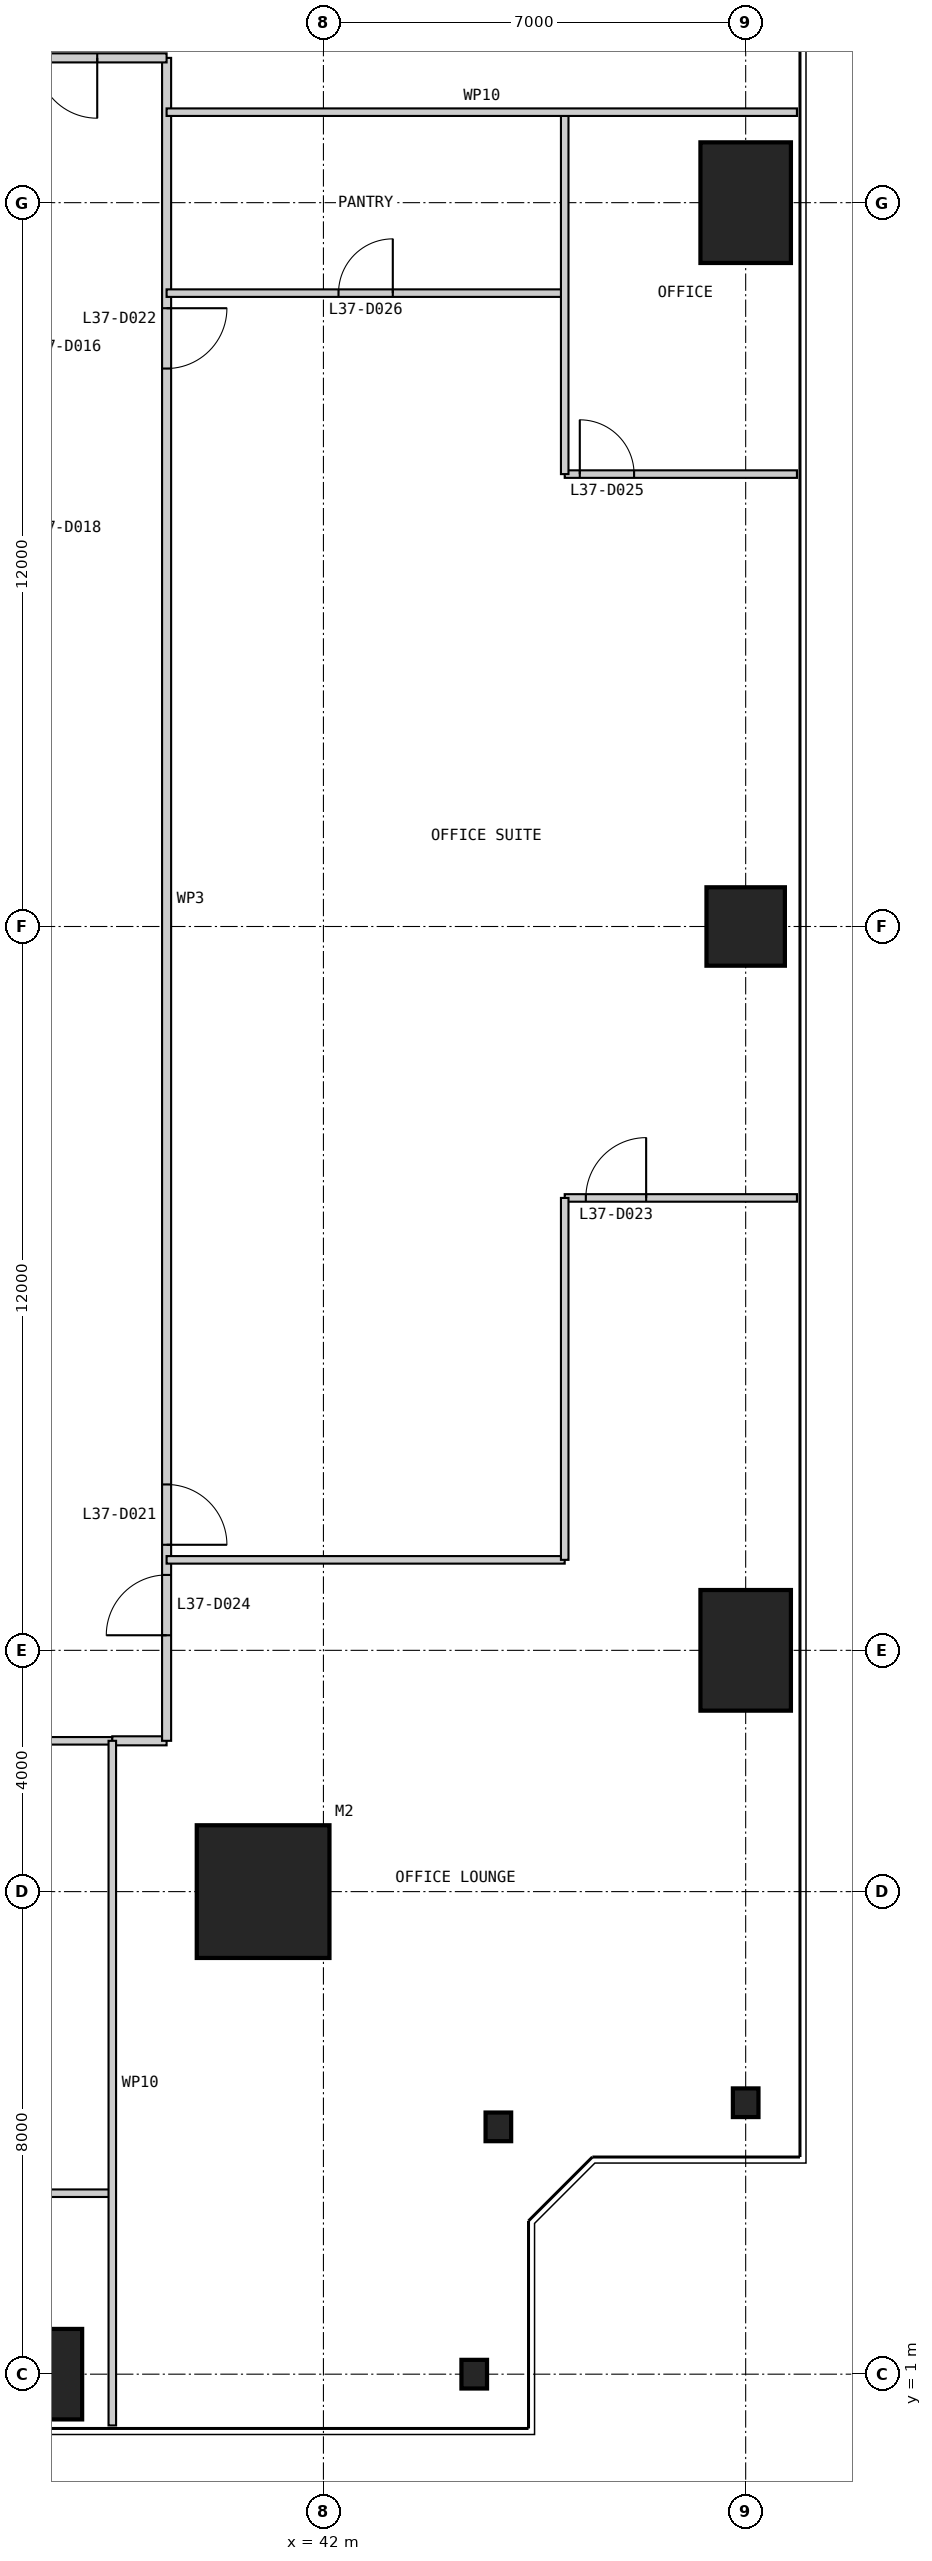
"""IFC4 building model, lengths in metres.
Left out: names, types, materials, properties, quantities, classifications, styles, units other than length and angle.
Written with IfcOpenShell. Run it as: python <this file> out.ifc"""

import sys

from ifc_helpers import new_model, si_unit, direction, frame, frame_2d, origin, origin_2d, place, context, subcontext, project, spatial, rectangle, i_section, extrude, element, fill, save


model = new_model("IFC4")
c1 = context("Model", 3, precision=1e-05, world=origin(), true_north=direction((0.0, 1.0)))
c2 = subcontext(c1, "Body", "Model", "MODEL_VIEW")
j1 = project(units=[si_unit("LENGTHUNIT", "METRE"), si_unit("PLANEANGLEUNIT", "RADIAN")], contexts=[c1])
p1 = place(None, origin())
s1 = spatial("IfcSite", under=j1, at=p1, CompositionType="ELEMENT")
p2 = place(p1, origin())
s2 = spatial("IfcBuilding", under=s1, at=p2, CompositionType="ELEMENT")
p3 = place(p2, frame((0.0, 0.0, 158.4)))
s3 = spatial("IfcBuildingStorey", under=s2, at=p3, CompositionType="ELEMENT", Elevation=158.4)
p4 = place(p3, frame((41.0, 9.0, 0.0), z_axis=(0.0, 0.0, 1.0), x_axis=(1.0, 0.0, 0.0)))
e1 = element("IfcColumn", 1, at=p4, inside=s3, PredefinedType="COLUMN", context=c2, shape_type="SweptSolid", body=[
    extrude(rectangle(XDim=2.2, YDim=2.2, at=origin_2d()), origin(), (0.0, 0.0, 1.0), 4.0),
])
p5 = place(p3, frame((37.0, 1.0, 0.0), z_axis=(0.0, 0.0, 1.0), x_axis=(1.0, 0.0, 0.0)))
e2 = element("IfcColumn", 2, at=p5, inside=s3, PredefinedType="COLUMN", context=c2, shape_type="SweptSolid", body=[
    extrude(rectangle(XDim=2.0, YDim=1.5, at=origin_2d()), origin(), (0.0, 0.0, 1.0), 4.0),
])
for number, where, z_axis, x_axis in (
    (3, (44.5, 1.0, 0.0), (0.0, 0.0, 1.0), (1.0, 0.0, 0.0)),
    (4, (44.9, 5.1, 0.0), (0.0, 0.0, 1.0), (1.0, 0.0, 0.0)),
    (5, (49.0, 5.5, 0.0), (0.0, 0.0, 1.0), (1.0, 0.0, 0.0)),
):
    element("IfcColumn", number, at=place(p3, frame(where, z_axis=z_axis, x_axis=x_axis)), inside=s3, PredefinedType="COLUMN", context=c2, shape_type="SweptSolid", body=[
        extrude(i_section(OverallWidth=0.424, OverallDepth=0.475, WebThickness=0.048, FlangeThickness=0.077, at=origin_2d()), origin(), (0.0, 0.0, 1.0), 4.0),
    ])
p6 = place(p3, frame((49.0, 13.0, 0.0), z_axis=(0.0, 0.0, 1.0), x_axis=(1.0, 0.0, 0.0)))
e6 = element("IfcColumn", 6, at=p6, inside=s3, PredefinedType="COLUMN", context=c2, shape_type="SweptSolid", body=[
    extrude(rectangle(XDim=1.5, YDim=2.0, at=origin_2d()), origin(), (0.0, 0.0, 1.0), 4.0),
])
p7 = place(p3, frame((49.0, 25.0, 0.0), z_axis=(0.0, 0.0, 1.0), x_axis=(1.0, 0.0, 0.0)))
e7 = element("IfcColumn", 7, at=p7, inside=s3, PredefinedType="COLUMN", context=c2, shape_type="SweptSolid", body=[
    extrude(rectangle(XDim=1.3, YDim=1.3, at=origin_2d()), origin(), (0.0, 0.0, 1.0), 4.0),
])
p8 = place(p3, frame((49.0, 37.0, 0.0), z_axis=(0.0, 0.0, 1.0), x_axis=(1.0, 0.0, 0.0)))
e8 = element("IfcColumn", 8, at=p8, inside=s3, PredefinedType="COLUMN", context=c2, shape_type="SweptSolid", body=[
    extrude(rectangle(XDim=1.5, YDim=2.0, at=origin_2d()), origin(), (0.0, 0.0, 1.0), 4.0),
])
p9 = place(p3, frame((32.5, 4.0, 0.0), z_axis=(0.0, 0.0, 1.0), x_axis=(1.0, 0.0, 0.0)))
e9 = element("IfcWall", 9, at=p9, inside=s3, PredefinedType="PARTITIONING", context=c2, shape_type="SweptSolid", body=[
    extrude(rectangle(XDim=6.0, YDim=0.125, at=frame_2d((3.0, 0.0))), origin(), (0.0, 0.0, 1.0), 3.8),
])
p10 = place(p3, frame((35.5, 11.5, 0.0), z_axis=(0.0, 0.0, 1.0), x_axis=(1.0, 0.0, 0.0)))
e10 = element("IfcWall", 10, at=p10, inside=s3, PredefinedType="PARTITIONING", context=c2, shape_type="SweptSolid", body=[
    extrude(rectangle(XDim=3.0, YDim=0.125, at=frame_2d((1.5, 0.0))), origin(), (0.0, 0.0, 1.0), 3.8),
])
p11 = place(p3, frame((38.5, 11.5, 0.0), z_axis=(0.0, 0.0, 1.0), x_axis=(1.0, 0.0, 0.0)))
e11 = element("IfcWall", 11, at=p11, inside=s3, PredefinedType="PARTITIONING", context=c2, shape_type="SweptSolid", body=[
    extrude(rectangle(XDim=0.9, YDim=0.15, at=frame_2d((0.45, 0.0))), origin(), (0.0, 0.0, 1.0), 3.8),
])
p12 = place(p3, frame((39.4, 11.5, 0.0), z_axis=(0.0, 0.0, 1.0), x_axis=(0.0, 1.0, 0.0)))
e12 = element("IfcWall", 12, at=p12, inside=s3, PredefinedType="PARTITIONING", context=c2, shape_type="SweptSolid", body=[
    extrude(rectangle(XDim=27.9, YDim=0.15, at=frame_2d((13.95, 0.0))), origin(), (0.0, 0.0, 1.0), 3.8),
])
p13 = place(p12, frame((3.25, 0.0, 0.0)))
e13 = element("IfcOpeningElement", 13, at=p13, cuts=e12, PredefinedType="OPENING", context=c2, shape_type="SweptSolid", body=[
    extrude(rectangle(XDim=1.0, YDim=2.2, at=frame_2d((0.5, 1.1))), frame((0.0, 0.085, 0.0), z_axis=(0.0, -1.0, 0.0), x_axis=(1.0, 0.0, 0.0)), (0.0, 0.0, 1.0), 0.17),
])
p14 = place(p12, frame((22.75, 0.0, 0.0)))
e14 = element("IfcOpeningElement", 14, at=p14, cuts=e12, PredefinedType="OPENING", context=c2, shape_type="SweptSolid", body=[
    extrude(rectangle(XDim=1.0, YDim=2.2, at=frame_2d((0.5, 1.1))), frame((0.0, 0.085, 0.0), z_axis=(0.0, -1.0, 0.0), x_axis=(1.0, 0.0, 0.0)), (0.0, 0.0, 1.0), 0.17),
])
p15 = place(p12, frame((1.75, 0.0, 0.0)))
e15 = element("IfcOpeningElement", 15, at=p15, cuts=e12, PredefinedType="OPENING", context=c2, shape_type="SweptSolid", body=[
    extrude(rectangle(XDim=1.0, YDim=2.2, at=frame_2d((0.5, 1.1))), frame((0.0, 0.085, 0.0), z_axis=(0.0, -1.0, 0.0), x_axis=(1.0, 0.0, 0.0)), (0.0, 0.0, 1.0), 0.17),
])
p16 = place(p3, frame((38.5, 0.15, 0.0), z_axis=(0.0, 0.0, 1.0), x_axis=(0.0, 1.0, 0.0)))
e16 = element("IfcWall", 16, at=p16, inside=s3, PredefinedType="PARTITIONING", context=c2, shape_type="SweptSolid", body=[
    extrude(rectangle(XDim=11.35, YDim=0.125, at=frame_2d((5.675, 0.0))), origin(), (0.0, 0.0, 1.0), 3.8),
])
p17 = place(p3, frame((46.0, 14.5, 0.0), z_axis=(0.0, 0.0, 1.0), x_axis=(-1.0, 0.0, 0.0)))
e17 = element("IfcWall", 17, at=p17, inside=s3, PredefinedType="PARTITIONING", context=c2, shape_type="SweptSolid", body=[
    extrude(rectangle(XDim=6.6, YDim=0.125, at=frame_2d((3.3, 0.0))), origin(), (0.0, 0.0, 1.0), 3.8),
])
p18 = place(p3, frame((49.85, 20.5, 0.0), z_axis=(0.0, 0.0, 1.0), x_axis=(-1.0, 0.0, 0.0)))
e18 = element("IfcWall", 18, at=p18, inside=s3, PredefinedType="PARTITIONING", context=c2, shape_type="SweptSolid", body=[
    extrude(rectangle(XDim=3.85, YDim=0.125, at=frame_2d((1.925, 0.0))), origin(), (0.0, 0.0, 1.0), 3.8),
])
p19 = place(p18, frame((2.5, 0.0, 0.0)))
e19 = element("IfcOpeningElement", 19, at=p19, cuts=e18, PredefinedType="OPENING", context=c2, shape_type="SweptSolid", body=[
    extrude(rectangle(XDim=1.0, YDim=2.2, at=frame_2d((0.5, 1.1))), frame((0.0, 0.073, 0.0), z_axis=(0.0, -1.0, 0.0), x_axis=(1.0, 0.0, 0.0)), (0.0, 0.0, 1.0), 0.145),
])
p20 = place(p3, frame((49.85, 32.5, 0.0), z_axis=(0.0, 0.0, 1.0), x_axis=(-1.0, 0.0, 0.0)))
e20 = element("IfcWall", 20, at=p20, inside=s3, PredefinedType="PARTITIONING", context=c2, shape_type="SweptSolid", body=[
    extrude(rectangle(XDim=3.85, YDim=0.125, at=frame_2d((1.925, 0.0))), origin(), (0.0, 0.0, 1.0), 3.8),
])
p21 = place(p20, frame((2.7, 0.0, 0.0)))
e21 = element("IfcOpeningElement", 21, at=p21, cuts=e20, PredefinedType="OPENING", context=c2, shape_type="SweptSolid", body=[
    extrude(rectangle(XDim=0.9, YDim=2.2, at=frame_2d((0.45, 1.1))), frame((0.0, 0.073, 0.0), z_axis=(0.0, -1.0, 0.0), x_axis=(1.0, 0.0, 0.0)), (0.0, 0.0, 1.0), 0.145),
])
p22 = place(p3, frame((46.0, 35.5, 0.0), z_axis=(0.0, 0.0, 1.0), x_axis=(-1.0, 0.0, 0.0)))
e22 = element("IfcWall", 22, at=p22, inside=s3, PredefinedType="PARTITIONING", context=c2, shape_type="SweptSolid", body=[
    extrude(rectangle(XDim=6.6, YDim=0.125, at=frame_2d((3.3, 0.0))), origin(), (0.0, 0.0, 1.0), 3.8),
])
p23 = place(p22, frame((2.85, 0.0, 0.0)))
e23 = element("IfcOpeningElement", 23, at=p23, cuts=e22, PredefinedType="OPENING", context=c2, shape_type="SweptSolid", body=[
    extrude(rectangle(XDim=0.9, YDim=2.2, at=frame_2d((0.45, 1.1))), frame((0.0, 0.073, 0.0), z_axis=(0.0, -1.0, 0.0), x_axis=(1.0, 0.0, 0.0)), (0.0, 0.0, 1.0), 0.145),
])
for number, where, z_axis, x_axis in (
    (24, (46.0, 14.5, 0.0), (0.0, 0.0, 1.0), (0.0, 1.0, 0.0)),
    (25, (46.0, 32.5, 0.0), (0.0, 0.0, 1.0), (0.0, 1.0, 0.0)),
):
    element("IfcWall", number, at=place(p3, frame(where, z_axis=z_axis, x_axis=x_axis)), inside=s3, PredefinedType="PARTITIONING", context=c2, shape_type="SweptSolid", body=[
        extrude(rectangle(XDim=6.0, YDim=0.125, at=frame_2d((3.0, 0.0))), origin(), (0.0, 0.0, 1.0), 2.954),
    ])
p24 = place(p3, frame((39.4, 39.4, 0.0), z_axis=(0.0, 0.0, 1.0), x_axis=(-1.0, 0.0, 0.0)))
e26 = element("IfcWall", 26, at=p24, inside=s3, PredefinedType="PARTITIONING", context=c2, shape_type="SweptSolid", body=[
    extrude(rectangle(XDim=28.8, YDim=0.15, at=frame_2d((14.4, 0.0))), origin(), (0.0, 0.0, 1.0), 3.8),
])
p25 = place(p24, frame((4.15, 0.0, 0.0)))
e27 = element("IfcOpeningElement", 27, at=p25, cuts=e26, PredefinedType="OPENING", context=c2, shape_type="SweptSolid", body=[
    extrude(rectangle(XDim=1.0, YDim=2.2, at=frame_2d((0.5, 1.1))), frame((0.0, 0.085, 0.0), z_axis=(0.0, -1.0, 0.0), x_axis=(1.0, 0.0, 0.0)), (0.0, 0.0, 1.0), 0.17),
])
p26 = place(p24, frame((23.65, 0.0, 0.0)))
e28 = element("IfcOpeningElement", 28, at=p26, cuts=e26, PredefinedType="OPENING", context=c2, shape_type="SweptSolid", body=[
    extrude(rectangle(XDim=1.0, YDim=2.2, at=frame_2d((0.5, 1.1))), frame((0.0, 0.085, 0.0), z_axis=(0.0, -1.0, 0.0), x_axis=(1.0, 0.0, 0.0)), (0.0, 0.0, 1.0), 0.17),
])
p27 = place(p24, frame((1.15, 0.0, 0.0)))
e29 = element("IfcOpeningElement", 29, at=p27, cuts=e26, PredefinedType="OPENING", context=c2, shape_type="SweptSolid", body=[
    extrude(rectangle(XDim=1.0, YDim=2.2, at=frame_2d((0.5, 1.1))), frame((0.0, 0.085, 0.0), z_axis=(0.0, -1.0, 0.0), x_axis=(1.0, 0.0, 0.0)), (0.0, 0.0, 1.0), 0.17),
])
p28 = place(p3, frame((49.85, 38.5, 0.0), z_axis=(0.0, 0.0, 1.0), x_axis=(-1.0, 0.0, 0.0)))
e30 = element("IfcWall", 30, at=p28, inside=s3, PredefinedType="PARTITIONING", context=c2, shape_type="SweptSolid", body=[
    extrude(rectangle(XDim=10.45, YDim=0.125, at=frame_2d((5.225, 0.0))), origin(), (0.0, 0.0, 1.0), 3.8),
])
p29 = place(p13, frame((1.0, 0.0, 0.0), z_axis=(0.0, 0.0, 1.0), x_axis=(-1.0, 0.0, 0.0)))
e31 = element("IfcDoor", 31, at=p29, inside=s3, OperationType="SINGLE_SWING_RIGHT", PredefinedType="DOOR", context=c2, shape_type="SweptSolid", body=[
    extrude(rectangle(XDim=1.0, YDim=2.2, at=frame_2d((0.5, 1.1))), frame((0.0, 0.025, 0.0), z_axis=(0.0, -1.0, 0.0), x_axis=(1.0, 0.0, 0.0)), (0.0, 0.0, 1.0), 0.05),
])
fill(e13, e31)
p30 = place(p14, frame((1.0, 0.0, 0.0), z_axis=(0.0, 0.0, 1.0), x_axis=(-1.0, 0.0, 0.0)))
e32 = element("IfcDoor", 32, at=p30, inside=s3, OperationType="SINGLE_SWING_LEFT", PredefinedType="DOOR", context=c2, shape_type="SweptSolid", body=[
    extrude(rectangle(XDim=1.0, YDim=2.2, at=frame_2d((0.5, 1.1))), frame((0.0, 0.025, 0.0), z_axis=(0.0, -1.0, 0.0), x_axis=(1.0, 0.0, 0.0)), (0.0, 0.0, 1.0), 0.05),
])
fill(e14, e32)
p31 = place(p19, frame((1.0, 0.0, 0.0), z_axis=(0.0, 0.0, 1.0), x_axis=(-1.0, 0.0, 0.0)))
e33 = element("IfcDoor", 33, at=p31, inside=s3, OperationType="SINGLE_SWING_RIGHT", PredefinedType="DOOR", context=c2, shape_type="SweptSolid", body=[
    extrude(rectangle(XDim=1.0, YDim=2.2, at=frame_2d((0.5, 1.1))), frame((0.0, 0.025, 0.0), z_axis=(0.0, -1.0, 0.0), x_axis=(1.0, 0.0, 0.0)), (0.0, 0.0, 1.0), 0.05),
])
fill(e19, e33)
p32 = place(p15, origin())
e34 = element("IfcDoor", 34, at=p32, inside=s3, OperationType="SINGLE_SWING_LEFT", PredefinedType="DOOR", context=c2, shape_type="SweptSolid", body=[
    extrude(rectangle(XDim=1.0, YDim=2.2, at=frame_2d((0.5, 1.1))), frame((0.0, 0.025, 0.0), z_axis=(0.0, -1.0, 0.0), x_axis=(1.0, 0.0, 0.0)), (0.0, 0.0, 1.0), 0.05),
])
fill(e15, e34)
p33 = place(p21, frame((0.9, 0.0, 0.0), z_axis=(0.0, 0.0, 1.0), x_axis=(-1.0, 0.0, 0.0)))
e35 = element("IfcDoor", 35, at=p33, inside=s3, OperationType="SINGLE_SWING_LEFT", PredefinedType="DOOR", context=c2, shape_type="SweptSolid", body=[
    extrude(rectangle(XDim=0.9, YDim=2.2, at=frame_2d((0.45, 1.1))), frame((0.0, 0.025, 0.0), z_axis=(0.0, -1.0, 0.0), x_axis=(1.0, 0.0, 0.0)), (0.0, 0.0, 1.0), 0.05),
])
fill(e21, e35)
p34 = place(p23, frame((0.9, 0.0, 0.0), z_axis=(0.0, 0.0, 1.0), x_axis=(-1.0, 0.0, 0.0)))
e36 = element("IfcDoor", 36, at=p34, inside=s3, OperationType="SINGLE_SWING_RIGHT", PredefinedType="DOOR", context=c2, shape_type="SweptSolid", body=[
    extrude(rectangle(XDim=0.9, YDim=2.2, at=frame_2d((0.45, 1.1))), frame((0.0, 0.025, 0.0), z_axis=(0.0, -1.0, 0.0), x_axis=(1.0, 0.0, 0.0)), (0.0, 0.0, 1.0), 0.05),
])
fill(e23, e36)
p35 = place(p27, origin())
e37 = element("IfcDoor", 37, at=p35, inside=s3, OperationType="SINGLE_SWING_LEFT", PredefinedType="DOOR", context=c2, shape_type="SweptSolid", body=[
    extrude(rectangle(XDim=1.0, YDim=2.2, at=frame_2d((0.5, 1.1))), frame((0.0, 0.025, 0.0), z_axis=(0.0, -1.0, 0.0), x_axis=(1.0, 0.0, 0.0)), (0.0, 0.0, 1.0), 0.05),
])
fill(e29, e37)
save(model, sys.argv[1])
